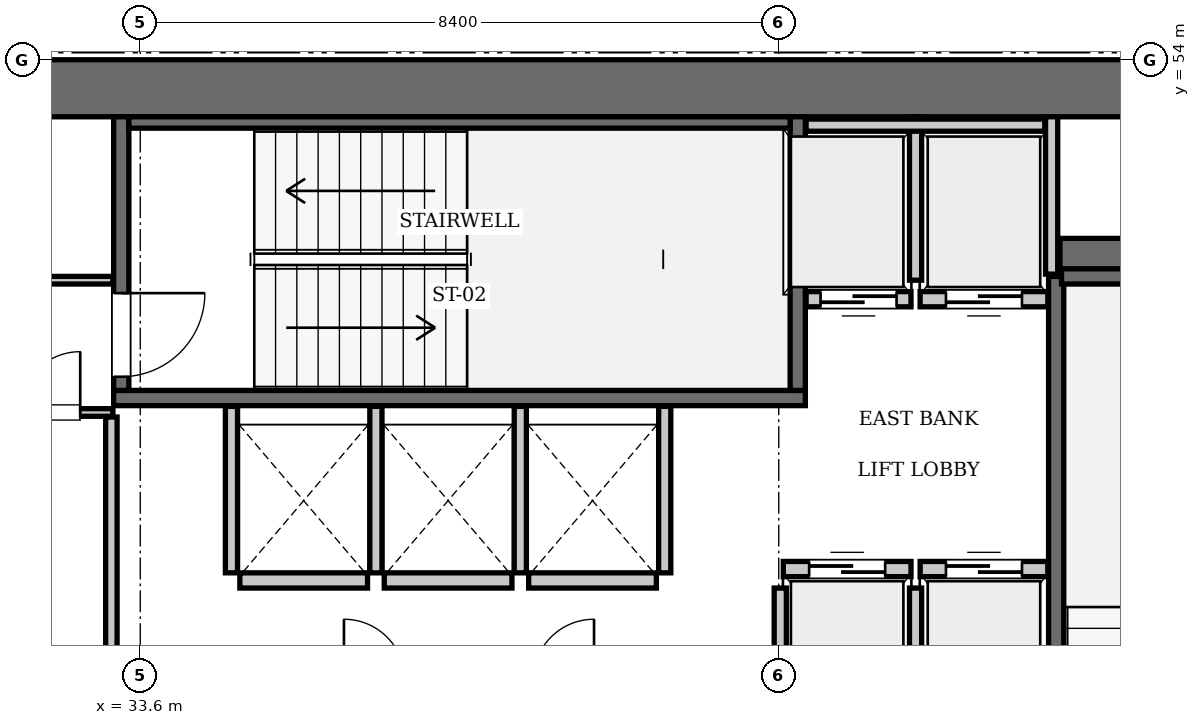
"""IFC4 building model, lengths in metres.
Left out: names, types, materials, properties, quantities, classifications, styles, units other than length and angle.
Written with IfcOpenShell. Run it as: python <this file> out.ifc"""

import sys

from ifc_helpers import new_model, si_unit, direction, frame, frame_2d, origin, place, context, subcontext, project, spatial, rectangle, extrude, element, fill, save


model = new_model("IFC4")
c1 = context("Model", 3, precision=1e-05, world=origin(), true_north=direction((0.0, 1.0)))
c2 = subcontext(c1, "Body", "Model", "MODEL_VIEW")
j1 = project(units=[si_unit("LENGTHUNIT", "METRE"), si_unit("PLANEANGLEUNIT", "RADIAN")], contexts=[c1])
p1 = place(None, origin())
s1 = spatial("IfcSite", under=j1, at=p1, CompositionType="ELEMENT")
p2 = place(p1, origin())
s2 = spatial("IfcBuilding", under=s1, at=p2, CompositionType="ELEMENT")
p3 = place(p2, frame((0.0, 0.0, 146.65)))
s3 = spatial("IfcBuildingStorey", under=s2, at=p3, CompositionType="ELEMENT", Elevation=146.65)
p4 = place(p3, frame((25.2, 53.625, 0.0), z_axis=(0.0, 0.0, 1.0), x_axis=(1.0, 0.0, 0.0)))
e1 = element("IfcWall", 1, at=p4, inside=s3, PredefinedType="SHEAR", context=c2, shape_type="SweptSolid", body=[
    extrude(rectangle(XDim=25.2, YDim=0.75, at=frame_2d((12.6, 0.0))), origin(), (0.0, 0.0, 1.0), 3.85),
])
p5 = place(p3, frame((45.7, 51.4, 0.0), z_axis=(0.0, 0.0, 1.0), x_axis=(1.0, 0.0, 0.0)))
e2 = element("IfcWall", 2, at=p5, inside=s3, PredefinedType="SHEAR", context=c2, shape_type="SweptSolid", body=[
    extrude(rectangle(XDim=3.95, YDim=0.5, at=frame_2d((1.975, 0.0))), origin(), (0.0, 0.0, 1.0), 3.85),
])
p6 = place(p3, frame((33.25, 49.55, 0.0), z_axis=(0.0, 0.0, 1.0), x_axis=(1.0, 0.0, 0.0)))
e3 = element("IfcWall", 3, at=p6, inside=s3, PredefinedType="SOLIDWALL", context=c2, shape_type="SweptSolid", body=[
    extrude(rectangle(XDim=9.1, YDim=0.2, at=frame_2d((4.55, 0.0))), origin(), (0.0, 0.0, 1.0), 3.61),
])
p7 = place(p3, frame((42.25, 49.65, 0.0), z_axis=(0.0, 0.0, 1.0), x_axis=(0.0, 1.0, 0.0)))
e4 = element("IfcWall", 4, at=p7, inside=s3, PredefinedType="SOLIDWALL", context=c2, shape_type="SweptSolid", body=[
    extrude(rectangle(XDim=3.6, YDim=0.2, at=frame_2d((1.8, 0.0))), origin(), (0.0, 0.0, 1.0), 3.61),
])
p8 = place(p3, frame((33.35, 49.65, 0.0), z_axis=(0.0, 0.0, 1.0), x_axis=(0.0, 1.0, 0.0)))
e5 = element("IfcWall", 5, at=p8, inside=s3, PredefinedType="SOLIDWALL", context=c2, shape_type="SweptSolid", body=[
    extrude(rectangle(XDim=3.6, YDim=0.2, at=frame_2d((1.8, 0.0))), origin(), (0.0, 0.0, 1.0), 3.61),
])
p9 = place(p8, frame((0.18, 0.0, 0.0)))
e6 = element("IfcOpeningElement", 6, at=p9, cuts=e5, PredefinedType="OPENING", context=c2, shape_type="SweptSolid", body=[
    extrude(rectangle(XDim=1.1, YDim=2.15, at=frame_2d((0.55, 1.075))), frame((0.0, 0.11, 0.0), z_axis=(0.0, -1.0, 0.0), x_axis=(1.0, 0.0, 0.0)), (0.0, 0.0, 1.0), 0.22),
])
p10 = place(p3, frame((33.45, 53.175, 0.0), z_axis=(0.0, 0.0, 1.0), x_axis=(1.0, 0.0, 0.0)))
e7 = element("IfcWall", 7, at=p10, inside=s3, PredefinedType="SOLIDWALL", context=c2, shape_type="SweptSolid", body=[
    extrude(rectangle(XDim=8.7, YDim=0.15, at=frame_2d((4.35, 0.0))), origin(), (0.0, 0.0, 1.0), 3.61),
])
p11 = place(p3, frame((45.65, 42.15, 0.0), z_axis=(0.0, 0.0, 1.0), x_axis=(0.0, 1.0, 0.0)))
e8 = element("IfcWall", 8, at=p11, inside=s3, PredefinedType="SOLIDWALL", context=c2, shape_type="SweptSolid", body=[
    extrude(rectangle(XDim=9.0, YDim=0.2, at=frame_2d((4.5, 0.0))), origin(), (0.0, 0.0, 1.0), 3.61),
])
p12 = place(p3, frame((45.72, 51.15, 0.0), z_axis=(0.0, 0.0, 1.0), x_axis=(1.0, 0.0, 0.0)))
e9 = element("IfcWall", 9, at=p12, inside=s3, PredefinedType="SOLIDWALL", context=c2, shape_type="SweptSolid", body=[
    extrude(rectangle(XDim=3.5, YDim=0.2, at=frame_2d((1.75, 0.0))), origin(), (0.0, 0.0, 1.0), 3.61),
])
p13 = place(p3, frame((42.06, 47.3, 0.0), z_axis=(0.0, 0.0, 1.0), x_axis=(1.0, 0.0, 0.0)))
e10 = element("IfcWall", 10, at=p13, inside=s3, PredefinedType="SOLIDWALL", context=c2, shape_type="SweptSolid", body=[
    extrude(rectangle(XDim=1.68, YDim=0.2, at=frame_2d((0.84, 0.0))), origin(), (0.0, 0.0, 1.0), 3.61),
])
p14 = place(p13, frame((0.34, 0.0, 0.0)))
e11 = element("IfcOpeningElement", 11, at=p14, cuts=e10, PredefinedType="OPENING", context=c2, shape_type="SweptSolid", body=[
    extrude(rectangle(XDim=1.0, YDim=2.15, at=frame_2d((0.5, 1.075))), frame((0.0, 0.11, 0.0), z_axis=(0.0, -1.0, 0.0), x_axis=(1.0, 0.0, 0.0)), (0.0, 0.0, 1.0), 0.22),
])
p15 = place(p3, frame((43.86, 47.3, 0.0), z_axis=(0.0, 0.0, 1.0), x_axis=(1.0, 0.0, 0.0)))
e12 = element("IfcWall", 12, at=p15, inside=s3, PredefinedType="SOLIDWALL", context=c2, shape_type="SweptSolid", body=[
    extrude(rectangle(XDim=1.68, YDim=0.2, at=frame_2d((0.84, 0.0))), origin(), (0.0, 0.0, 1.0), 3.61),
])
p16 = place(p15, frame((0.34, 0.0, 0.0)))
e13 = element("IfcOpeningElement", 13, at=p16, cuts=e12, PredefinedType="OPENING", context=c2, shape_type="SweptSolid", body=[
    extrude(rectangle(XDim=1.0, YDim=2.15, at=frame_2d((0.5, 1.075))), frame((0.0, 0.11, 0.0), z_axis=(0.0, -1.0, 0.0), x_axis=(1.0, 0.0, 0.0)), (0.0, 0.0, 1.0), 0.22),
])
p17 = place(p3, frame((42.36, 50.85, 0.0), z_axis=(0.0, 0.0, 1.0), x_axis=(1.0, 0.0, 0.0)))
e14 = element("IfcWall", 14, at=p17, inside=s3, PredefinedType="SOLIDWALL", context=c2, shape_type="SweptSolid", body=[
    extrude(rectangle(XDim=1.38, YDim=0.2, at=frame_2d((0.69, 0.0))), origin(), (0.0, 0.0, 1.0), 3.61),
])
p18 = place(p17, frame((0.19, 0.0, 0.0)))
e15 = element("IfcOpeningElement", 15, at=p18, cuts=e14, PredefinedType="OPENING", context=c2, shape_type="SweptSolid", body=[
    extrude(rectangle(XDim=1.0, YDim=2.15, at=frame_2d((0.5, 1.075))), frame((0.0, 0.11, 0.0), z_axis=(0.0, -1.0, 0.0), x_axis=(1.0, 0.0, 0.0)), (0.0, 0.0, 1.0), 0.22),
])
p19 = place(p3, frame((43.86, 50.85, 0.0), z_axis=(0.0, 0.0, 1.0), x_axis=(1.0, 0.0, 0.0)))
e16 = element("IfcWall", 16, at=p19, inside=s3, PredefinedType="SOLIDWALL", context=c2, shape_type="SweptSolid", body=[
    extrude(rectangle(XDim=1.68, YDim=0.2, at=frame_2d((0.84, 0.0))), origin(), (0.0, 0.0, 1.0), 3.61),
])
p20 = place(p19, frame((0.34, 0.0, 0.0)))
e17 = element("IfcOpeningElement", 17, at=p20, cuts=e16, PredefinedType="OPENING", context=c2, shape_type="SweptSolid", body=[
    extrude(rectangle(XDim=1.0, YDim=2.15, at=frame_2d((0.5, 1.075))), frame((0.0, 0.11, 0.0), z_axis=(0.0, -1.0, 0.0), x_axis=(1.0, 0.0, 0.0)), (0.0, 0.0, 1.0), 0.22),
])
p21 = place(p3, frame((34.91, 47.15, 0.0), z_axis=(0.0, 0.0, 1.0), x_axis=(1.0, 0.0, 0.0)))
e18 = element("IfcWall", 18, at=p21, inside=s3, PredefinedType="SOLIDWALL", context=c2, shape_type="SweptSolid", body=[
    extrude(rectangle(XDim=1.68, YDim=0.2, at=frame_2d((0.84, 0.0))), origin(), (0.0, 0.0, 1.0), 3.61),
])
for number, where, z_axis, x_axis in (
    (19, (36.81, 47.15, 0.0), (0.0, 0.0, 1.0), (1.0, 0.0, 0.0)),
    (20, (38.71, 47.15, 0.0), (0.0, 0.0, 1.0), (1.0, 0.0, 0.0)),
):
    element("IfcWall", number, at=place(p3, frame(where, z_axis=z_axis, x_axis=x_axis)), inside=s3, PredefinedType="SOLIDWALL", context=c2, shape_type="SweptSolid", body=[
        extrude(rectangle(XDim=1.68, YDim=0.2, at=frame_2d((0.84, 0.0))), origin(), (0.0, 0.0, 1.0), 3.61),
    ])
for number, where, z_axis, x_axis in (
    (21, (42.02, 45.1, 0.0), (0.0, 0.0, 1.0), (0.0, 1.0, 0.0)),
    (22, (43.8, 45.1, 0.0), (0.0, 0.0, 1.0), (0.0, 1.0, 0.0)),
):
    element("IfcWall", number, at=place(p3, frame(where, z_axis=z_axis, x_axis=x_axis)), inside=s3, PredefinedType="SOLIDWALL", context=c2, shape_type="SweptSolid", body=[
        extrude(rectangle(XDim=1.95, YDim=0.16, at=frame_2d((0.975, 0.0))), origin(), (0.0, 0.0, 1.0), 3.61),
    ])
p22 = place(p3, frame((45.59, 51.18, 0.0), z_axis=(0.0, 0.0, 1.0), x_axis=(0.0, 1.0, 0.0)))
e23 = element("IfcWall", 23, at=p22, inside=s3, PredefinedType="SOLIDWALL", context=c2, shape_type="SweptSolid", body=[
    extrude(rectangle(XDim=2.07, YDim=0.16, at=frame_2d((1.035, 0.0))), origin(), (0.0, 0.0, 1.0), 3.61),
])
p23 = place(p3, frame((43.8, 51.1, 0.0), z_axis=(0.0, 0.0, 1.0), x_axis=(0.0, 1.0, 0.0)))
e24 = element("IfcWall", 24, at=p23, inside=s3, PredefinedType="SOLIDWALL", context=c2, shape_type="SweptSolid", body=[
    extrude(rectangle(XDim=2.15, YDim=0.16, at=frame_2d((1.075, 0.0))), origin(), (0.0, 0.0, 1.0), 3.61),
])
p24 = place(p3, frame((42.36, 53.14, 0.0), z_axis=(0.0, 0.0, 1.0), x_axis=(1.0, 0.0, 0.0)))
e25 = element("IfcWall", 25, at=p24, inside=s3, PredefinedType="SOLIDWALL", context=c2, shape_type="SweptSolid", body=[
    extrude(rectangle(XDim=3.14, YDim=0.16, at=frame_2d((1.57, 0.0))), origin(), (0.0, 0.0, 1.0), 3.61),
])
for number, where, z_axis, x_axis in (
    (26, (34.8, 47.25, 0.0), (0.0, 0.0, 1.0), (0.0, 1.0, 0.0)),
    (27, (36.7, 47.25, 0.0), (0.0, 0.0, 1.0), (0.0, 1.0, 0.0)),
    (28, (38.6, 47.25, 0.0), (0.0, 0.0, 1.0), (0.0, 1.0, 0.0)),
    (29, (40.5, 47.25, 0.0), (0.0, 0.0, 1.0), (0.0, 1.0, 0.0)),
):
    element("IfcWall", number, at=place(p3, frame(where, z_axis=z_axis, x_axis=x_axis)), inside=s3, PredefinedType="SOLIDWALL", context=c2, shape_type="SweptSolid", body=[
        extrude(rectangle(XDim=2.19, YDim=0.16, at=frame_2d((1.095, 0.0))), origin(), (0.0, 0.0, 1.0), 3.61),
    ])
p25 = place(p3, frame((33.22, 45.14, 0.0), z_axis=(0.0, 0.0, 1.0), x_axis=(0.0, 1.0, 0.0)))
e30 = element("IfcWall", 30, at=p25, inside=s3, PredefinedType="PARTITIONING", context=c2, shape_type="SweptSolid", body=[
    extrude(rectangle(XDim=4.16, YDim=0.15, at=frame_2d((2.08, 0.0))), origin(), (0.0, 0.0, 1.0), 3.61),
])
p26 = place(p3, frame((30.06, 49.36, 0.0), z_axis=(0.0, 0.0, 1.0), x_axis=(1.0, 0.0, 0.0)))
e31 = element("IfcWall", 31, at=p26, inside=s3, PredefinedType="PARTITIONING", context=c2, shape_type="SweptSolid", body=[
    extrude(rectangle(XDim=3.18, YDim=0.1, at=frame_2d((1.59, 0.0))), origin(), (0.0, 0.0, 1.0), 3.61),
])
p27 = place(p26, frame((1.95, 0.0, 0.0)))
e32 = element("IfcOpeningElement", 32, at=p27, cuts=e31, PredefinedType="OPENING", context=c2, shape_type="SweptSolid", body=[
    extrude(rectangle(XDim=0.8, YDim=2.05, at=frame_2d((0.4, 1.025))), frame((0.0, 0.06, 0.0), z_axis=(0.0, -1.0, 0.0), x_axis=(1.0, 0.0, 0.0)), (0.0, 0.0, 1.0), 0.12),
])
p28 = place(p3, frame((31.82, 51.1, 0.0), z_axis=(0.0, 0.0, 1.0), x_axis=(1.0, 0.0, 0.0)))
e33 = element("IfcWall", 33, at=p28, inside=s3, PredefinedType="PARTITIONING", context=c2, shape_type="SweptSolid", body=[
    extrude(rectangle(XDim=1.42, YDim=0.1, at=frame_2d((0.71, 0.0))), origin(), (0.0, 0.0, 1.0), 3.61),
])
p29 = place(p9, frame((1.1, 0.0, 0.0), z_axis=(0.0, 0.0, 1.0), x_axis=(-1.0, 0.0, 0.0)))
e34 = element("IfcDoor", 34, at=p29, inside=s3, OperationType="SINGLE_SWING_LEFT", PredefinedType="DOOR", context=c2, shape_type="SweptSolid", body=[
    extrude(rectangle(XDim=1.1, YDim=2.15, at=frame_2d((0.55, 1.075))), frame((0.0, 0.025, 0.0), z_axis=(0.0, -1.0, 0.0), x_axis=(1.0, 0.0, 0.0)), (0.0, 0.0, 1.0), 0.05),
])
fill(e6, e34)
p30 = place(p14, origin())
e35 = element("IfcDoor", 35, at=p30, inside=s3, OperationType="SLIDING_TO_LEFT", PredefinedType="DOOR", context=c2, shape_type="SweptSolid", body=[
    extrude(rectangle(XDim=1.0, YDim=2.15, at=frame_2d((0.5, 1.075))), frame((0.0, 0.025, 0.0), z_axis=(0.0, -1.0, 0.0), x_axis=(1.0, 0.0, 0.0)), (0.0, 0.0, 1.0), 0.05),
])
fill(e11, e35)
p31 = place(p16, origin())
e36 = element("IfcDoor", 36, at=p31, inside=s3, OperationType="SLIDING_TO_LEFT", PredefinedType="DOOR", context=c2, shape_type="SweptSolid", body=[
    extrude(rectangle(XDim=1.0, YDim=2.15, at=frame_2d((0.5, 1.075))), frame((0.0, 0.025, 0.0), z_axis=(0.0, -1.0, 0.0), x_axis=(1.0, 0.0, 0.0)), (0.0, 0.0, 1.0), 0.05),
])
fill(e13, e36)
p32 = place(p18, frame((1.0, 0.0, 0.0), z_axis=(0.0, 0.0, 1.0), x_axis=(-1.0, 0.0, 0.0)))
e37 = element("IfcDoor", 37, at=p32, inside=s3, OperationType="SLIDING_TO_LEFT", PredefinedType="DOOR", context=c2, shape_type="SweptSolid", body=[
    extrude(rectangle(XDim=1.0, YDim=2.15, at=frame_2d((0.5, 1.075))), frame((0.0, 0.025, 0.0), z_axis=(0.0, -1.0, 0.0), x_axis=(1.0, 0.0, 0.0)), (0.0, 0.0, 1.0), 0.05),
])
fill(e15, e37)
p33 = place(p20, frame((1.0, 0.0, 0.0), z_axis=(0.0, 0.0, 1.0), x_axis=(-1.0, 0.0, 0.0)))
e38 = element("IfcDoor", 38, at=p33, inside=s3, OperationType="SLIDING_TO_LEFT", PredefinedType="DOOR", context=c2, shape_type="SweptSolid", body=[
    extrude(rectangle(XDim=1.0, YDim=2.15, at=frame_2d((0.5, 1.075))), frame((0.0, 0.025, 0.0), z_axis=(0.0, -1.0, 0.0), x_axis=(1.0, 0.0, 0.0)), (0.0, 0.0, 1.0), 0.05),
])
fill(e17, e38)
p34 = place(p27, origin())
e39 = element("IfcDoor", 39, at=p34, inside=s3, OperationType="SINGLE_SWING_RIGHT", PredefinedType="DOOR", context=c2, shape_type="SweptSolid", body=[
    extrude(rectangle(XDim=0.8, YDim=2.05, at=frame_2d((0.4, 1.025))), frame((0.0, 0.025, 0.0), z_axis=(0.0, -1.0, 0.0), x_axis=(1.0, 0.0, 0.0)), (0.0, 0.0, 1.0), 0.05),
])
fill(e32, e39)
save(model, sys.argv[1])
